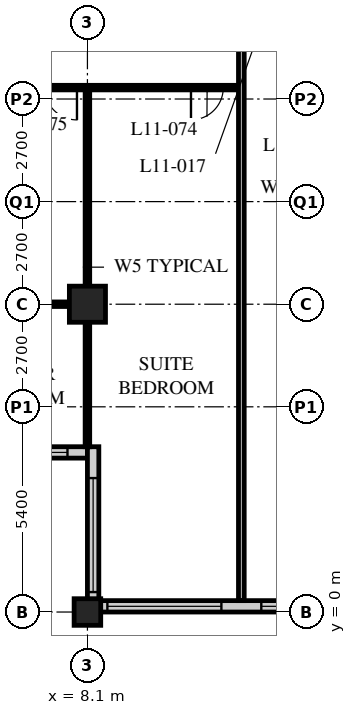
"""IFC4 building model, lengths in metres.
Left out: names, types, materials, properties, quantities, classifications, styles, units other than length and angle.
Written with IfcOpenShell. Run it as: python <this file> out.ifc"""

import sys

from ifc_helpers import new_model, si_unit, direction, frame, frame_2d, origin, origin_2d, place, context, subcontext, project, spatial, rectangle, hollow_rectangle, extrude, element, fill, save


model = new_model("IFC4")
c1 = context("Model", 3, precision=1e-05, world=origin(), true_north=direction((0.0, 1.0)))
c2 = subcontext(c1, "Body", "Model", "MODEL_VIEW")
j1 = project(units=[si_unit("LENGTHUNIT", "METRE"), si_unit("PLANEANGLEUNIT", "RADIAN")], contexts=[c1])
p1 = place(None, origin())
s1 = spatial("IfcSite", under=j1, at=p1, CompositionType="ELEMENT")
p2 = place(p1, origin())
s2 = spatial("IfcBuilding", under=s1, at=p2, CompositionType="ELEMENT")
p3 = place(p2, frame((0.0, 0.0, 50.0)))
s3 = spatial("IfcBuildingStorey", under=s2, at=p3, CompositionType="ELEMENT", Elevation=50.0)
p4 = place(p3, frame((8.1, 0.0, 0.0), z_axis=(0.0, 0.0, 1.0), x_axis=(1.0, 0.0, 0.0)))
e1 = element("IfcColumn", 1, at=p4, inside=s3, PredefinedType="COLUMN", context=c2, shape_type="SweptSolid", body=[
    extrude(hollow_rectangle(XDim=0.7, YDim=0.7, WallThickness=0.06, at=origin_2d()), origin(), (0.0, 0.0, 1.0), 3.4),
])
p5 = place(p3, frame((8.1, 8.1, 0.0), z_axis=(0.0, 0.0, 1.0), x_axis=(1.0, 0.0, 0.0)))
e2 = element("IfcColumn", 2, at=p5, inside=s3, PredefinedType="COLUMN", context=c2, shape_type="SweptSolid", body=[
    extrude(hollow_rectangle(XDim=0.95, YDim=0.95, WallThickness=0.095, at=origin_2d()), origin(), (0.0, 0.0, 1.0), 3.4),
])
p6 = place(p3, frame((8.4, 0.15, 0.0), z_axis=(0.0, 0.0, 1.0), x_axis=(1.0, 0.0, 0.0)))
e3 = element("IfcWall", 3, at=p6, inside=s3, PredefinedType="SOLIDWALL", context=c2, shape_type="SweptSolid", body=[
    extrude(rectangle(XDim=40.2, YDim=0.3, at=frame_2d((20.1, 0.0))), origin(), (0.0, 0.0, 1.0), 3.19),
])
p7 = place(p6, frame((0.225, 0.0, 0.9)))
e4 = element("IfcOpeningElement", 4, at=p7, cuts=e3, PredefinedType="OPENING", context=c2, shape_type="SweptSolid", body=[
    extrude(rectangle(XDim=3.0, YDim=2.0, at=frame_2d((1.5, 1.0))), frame((0.0, 0.16, 0.0), z_axis=(0.0, -1.0, 0.0), x_axis=(1.0, 0.0, 0.0)), (0.0, 0.0, 1.0), 0.32),
])
p8 = place(p6, frame((4.275, 0.0, 0.9)))
e5 = element("IfcOpeningElement", 5, at=p8, cuts=e3, PredefinedType="OPENING", context=c2, shape_type="SweptSolid", body=[
    extrude(rectangle(XDim=3.0, YDim=2.0, at=frame_2d((1.5, 1.0))), frame((0.0, 0.16, 0.0), z_axis=(0.0, -1.0, 0.0), x_axis=(1.0, 0.0, 0.0)), (0.0, 0.0, 1.0), 0.32),
])
p9 = place(p6, frame((8.325, 0.0, 0.9)))
e6 = element("IfcOpeningElement", 6, at=p9, cuts=e3, PredefinedType="OPENING", context=c2, shape_type="SweptSolid", body=[
    extrude(rectangle(XDim=3.0, YDim=2.0, at=frame_2d((1.5, 1.0))), frame((0.0, 0.16, 0.0), z_axis=(0.0, -1.0, 0.0), x_axis=(1.0, 0.0, 0.0)), (0.0, 0.0, 1.0), 0.32),
])
p10 = place(p6, frame((12.375, 0.0, 0.9)))
e7 = element("IfcOpeningElement", 7, at=p10, cuts=e3, PredefinedType="OPENING", context=c2, shape_type="SweptSolid", body=[
    extrude(rectangle(XDim=3.0, YDim=2.0, at=frame_2d((1.5, 1.0))), frame((0.0, 0.16, 0.0), z_axis=(0.0, -1.0, 0.0), x_axis=(1.0, 0.0, 0.0)), (0.0, 0.0, 1.0), 0.32),
])
p11 = place(p6, frame((16.425, 0.0, 0.9)))
e8 = element("IfcOpeningElement", 8, at=p11, cuts=e3, PredefinedType="OPENING", context=c2, shape_type="SweptSolid", body=[
    extrude(rectangle(XDim=3.0, YDim=2.0, at=frame_2d((1.5, 1.0))), frame((0.0, 0.16, 0.0), z_axis=(0.0, -1.0, 0.0), x_axis=(1.0, 0.0, 0.0)), (0.0, 0.0, 1.0), 0.32),
])
p12 = place(p6, frame((20.475, 0.0, 0.9)))
e9 = element("IfcOpeningElement", 9, at=p12, cuts=e3, PredefinedType="OPENING", context=c2, shape_type="SweptSolid", body=[
    extrude(rectangle(XDim=3.0, YDim=2.0, at=frame_2d((1.5, 1.0))), frame((0.0, 0.16, 0.0), z_axis=(0.0, -1.0, 0.0), x_axis=(1.0, 0.0, 0.0)), (0.0, 0.0, 1.0), 0.32),
])
p13 = place(p6, frame((24.525, 0.0, 0.9)))
e10 = element("IfcOpeningElement", 10, at=p13, cuts=e3, PredefinedType="OPENING", context=c2, shape_type="SweptSolid", body=[
    extrude(rectangle(XDim=3.0, YDim=2.0, at=frame_2d((1.5, 1.0))), frame((0.0, 0.16, 0.0), z_axis=(0.0, -1.0, 0.0), x_axis=(1.0, 0.0, 0.0)), (0.0, 0.0, 1.0), 0.32),
])
p14 = place(p6, frame((28.575, 0.0, 0.9)))
e11 = element("IfcOpeningElement", 11, at=p14, cuts=e3, PredefinedType="OPENING", context=c2, shape_type="SweptSolid", body=[
    extrude(rectangle(XDim=3.0, YDim=2.0, at=frame_2d((1.5, 1.0))), frame((0.0, 0.16, 0.0), z_axis=(0.0, -1.0, 0.0), x_axis=(1.0, 0.0, 0.0)), (0.0, 0.0, 1.0), 0.32),
])
p15 = place(p6, frame((32.625, 0.0, 0.9)))
e12 = element("IfcOpeningElement", 12, at=p15, cuts=e3, PredefinedType="OPENING", context=c2, shape_type="SweptSolid", body=[
    extrude(rectangle(XDim=3.0, YDim=2.0, at=frame_2d((1.5, 1.0))), frame((0.0, 0.16, 0.0), z_axis=(0.0, -1.0, 0.0), x_axis=(1.0, 0.0, 0.0)), (0.0, 0.0, 1.0), 0.32),
])
p16 = place(p6, frame((36.675, 0.0, 0.9)))
e13 = element("IfcOpeningElement", 13, at=p16, cuts=e3, PredefinedType="OPENING", context=c2, shape_type="SweptSolid", body=[
    extrude(rectangle(XDim=3.0, YDim=2.0, at=frame_2d((1.5, 1.0))), frame((0.0, 0.16, 0.0), z_axis=(0.0, -1.0, 0.0), x_axis=(1.0, 0.0, 0.0)), (0.0, 0.0, 1.0), 0.32),
])
p17 = place(p3, frame((4.35, 4.2, 0.0), z_axis=(0.0, 0.0, 1.0), x_axis=(1.0, 0.0, 0.0)))
e14 = element("IfcWall", 14, at=p17, inside=s3, PredefinedType="SOLIDWALL", context=c2, shape_type="SweptSolid", body=[
    extrude(rectangle(XDim=3.75, YDim=0.3, at=frame_2d((1.875, 0.0))), origin(), (0.0, 0.0, 1.0), 3.19),
])
p18 = place(p17, frame((0.225, 0.0, 0.9)))
e15 = element("IfcOpeningElement", 15, at=p18, cuts=e14, PredefinedType="OPENING", context=c2, shape_type="SweptSolid", body=[
    extrude(rectangle(XDim=3.0, YDim=1.5, at=frame_2d((1.5, 0.75))), frame((0.0, 0.16, 0.0), z_axis=(0.0, -1.0, 0.0), x_axis=(1.0, 0.0, 0.0)), (0.0, 0.0, 1.0), 0.32),
])
p19 = place(p3, frame((8.25, 4.35, 0.0), z_axis=(0.0, 0.0, 1.0), x_axis=(0.0, -1.0, 0.0)))
e16 = element("IfcWall", 16, at=p19, inside=s3, PredefinedType="SOLIDWALL", context=c2, shape_type="SweptSolid", body=[
    extrude(rectangle(XDim=4.35, YDim=0.3, at=frame_2d((2.175, 0.0))), origin(), (0.0, 0.0, 1.0), 3.19),
])
p20 = place(p19, frame((0.825, 0.0, 0.9)))
e17 = element("IfcOpeningElement", 17, at=p20, cuts=e16, PredefinedType="OPENING", context=c2, shape_type="SweptSolid", body=[
    extrude(rectangle(XDim=3.0, YDim=1.5, at=frame_2d((1.5, 0.75))), frame((0.0, 0.16, 0.0), z_axis=(0.0, -1.0, 0.0), x_axis=(1.0, 0.0, 0.0)), (0.0, 0.0, 1.0), 0.32),
])
p21 = place(p3, frame((4.1, 13.8, 0.0), z_axis=(0.0, 0.0, 1.0), x_axis=(1.0, 0.0, 0.0)))
e18 = element("IfcWall", 18, at=p21, inside=s3, PredefinedType="PARTITIONING", context=c2, shape_type="SweptSolid", body=[
    extrude(rectangle(XDim=8.05, YDim=0.12, at=frame_2d((4.025, 0.0))), origin(), (0.0, 0.0, 1.0), 3.19),
])
p22 = place(p21, frame((6.725, 0.0, 0.0)))
e19 = element("IfcOpeningElement", 19, at=p22, cuts=e18, PredefinedType="OPENING", context=c2, shape_type="SweptSolid", body=[
    extrude(rectangle(XDim=0.85, YDim=2.1, at=frame_2d((0.425, 1.05))), frame((0.0, 0.07, 0.0), z_axis=(0.0, -1.0, 0.0), x_axis=(1.0, 0.0, 0.0)), (0.0, 0.0, 1.0), 0.14),
])
p23 = place(p21, frame((2.875, 0.0, 0.0)))
e20 = element("IfcOpeningElement", 20, at=p23, cuts=e18, PredefinedType="OPENING", context=c2, shape_type="SweptSolid", body=[
    extrude(rectangle(XDim=0.85, YDim=2.1, at=frame_2d((0.425, 1.05))), frame((0.0, 0.07, 0.0), z_axis=(0.0, -1.0, 0.0), x_axis=(1.0, 0.0, 0.0)), (0.0, 0.0, 1.0), 0.14),
])
p24 = place(p3, frame((8.1, 13.8, 0.0), z_axis=(0.0, 0.0, 1.0), x_axis=(0.0, -1.0, 0.0)))
e21 = element("IfcWall", 21, at=p24, inside=s3, PredefinedType="PARTITIONING", context=c2, shape_type="SweptSolid", body=[
    extrude(rectangle(XDim=9.45, YDim=0.12, at=frame_2d((4.725, 0.0))), origin(), (0.0, 0.0, 1.0), 2.578),
])
p25 = place(p3, frame((8.1, 8.1, 0.0), z_axis=(0.0, 0.0, 1.0), x_axis=(-1.0, 0.0, 0.0)))
e22 = element("IfcWall", 22, at=p25, inside=s3, PredefinedType="PARTITIONING", context=c2, shape_type="SweptSolid", body=[
    extrude(rectangle(XDim=3.75, YDim=0.12, at=frame_2d((1.875, 0.0))), origin(), (0.0, 0.0, 1.0), 2.578),
])
p26 = place(p25, frame((1.875, 0.0, 0.0)))
e23 = element("IfcOpeningElement", 23, at=p26, cuts=e22, PredefinedType="OPENING", context=c2, shape_type="SweptSolid", body=[
    extrude(rectangle(XDim=0.85, YDim=2.1, at=frame_2d((0.425, 1.05))), frame((0.0, 0.07, 0.0), z_axis=(0.0, -1.0, 0.0), x_axis=(1.0, 0.0, 0.0)), (0.0, 0.0, 1.0), 0.14),
])
p27 = place(p3, frame((12.15, 16.2, 0.0), z_axis=(0.0, 0.0, 1.0), x_axis=(0.0, -1.0, 0.0)))
e24 = element("IfcWall", 24, at=p27, inside=s3, PredefinedType="PARTITIONING", context=c2, shape_type="SweptSolid", body=[
    extrude(rectangle(XDim=15.9, YDim=0.15, at=frame_2d((7.95, 0.0))), origin(), (0.0, 0.0, 1.0), 3.19),
])
p28 = place(p7, origin())
e25 = element("IfcWindow", 25, at=p28, inside=s3, PartitioningType="SINGLE_PANEL", PredefinedType="WINDOW", context=c2, shape_type="SweptSolid", body=[
    extrude(rectangle(XDim=3.0, YDim=2.0, at=frame_2d((1.5, 1.0))), frame((0.0, 0.03, 0.0), z_axis=(0.0, -1.0, 0.0), x_axis=(1.0, 0.0, 0.0)), (0.0, 0.0, 1.0), 0.06),
])
fill(e4, e25)
p29 = place(p8, origin())
e26 = element("IfcWindow", 26, at=p29, inside=s3, PartitioningType="SINGLE_PANEL", PredefinedType="WINDOW", context=c2, shape_type="SweptSolid", body=[
    extrude(rectangle(XDim=3.0, YDim=2.0, at=frame_2d((1.5, 1.0))), frame((0.0, 0.03, 0.0), z_axis=(0.0, -1.0, 0.0), x_axis=(1.0, 0.0, 0.0)), (0.0, 0.0, 1.0), 0.06),
])
fill(e5, e26)
p30 = place(p18, origin())
e27 = element("IfcWindow", 27, at=p30, inside=s3, PartitioningType="SINGLE_PANEL", PredefinedType="WINDOW", context=c2, shape_type="SweptSolid", body=[
    extrude(rectangle(XDim=3.0, YDim=1.5, at=frame_2d((1.5, 0.75))), frame((0.0, 0.03, 0.0), z_axis=(0.0, -1.0, 0.0), x_axis=(1.0, 0.0, 0.0)), (0.0, 0.0, 1.0), 0.06),
])
fill(e15, e27)
p31 = place(p20, origin())
e28 = element("IfcWindow", 28, at=p31, inside=s3, PartitioningType="SINGLE_PANEL", PredefinedType="WINDOW", context=c2, shape_type="SweptSolid", body=[
    extrude(rectangle(XDim=3.0, YDim=1.5, at=frame_2d((1.5, 0.75))), frame((0.0, 0.03, 0.0), z_axis=(0.0, -1.0, 0.0), x_axis=(1.0, 0.0, 0.0)), (0.0, 0.0, 1.0), 0.06),
])
fill(e17, e28)
p32 = place(p22, origin())
e29 = element("IfcDoor", 29, at=p32, inside=s3, OperationType="SINGLE_SWING_RIGHT", PredefinedType="DOOR", context=c2, shape_type="SweptSolid", body=[
    extrude(rectangle(XDim=0.85, YDim=2.1, at=frame_2d((0.425, 1.05))), frame((0.0, 0.025, 0.0), z_axis=(0.0, -1.0, 0.0), x_axis=(1.0, 0.0, 0.0)), (0.0, 0.0, 1.0), 0.05),
])
fill(e19, e29)
p33 = place(p23, origin())
e30 = element("IfcDoor", 30, at=p33, inside=s3, OperationType="SINGLE_SWING_LEFT", PredefinedType="DOOR", context=c2, shape_type="SweptSolid", body=[
    extrude(rectangle(XDim=0.85, YDim=2.1, at=frame_2d((0.425, 1.05))), frame((0.0, 0.025, 0.0), z_axis=(0.0, -1.0, 0.0), x_axis=(1.0, 0.0, 0.0)), (0.0, 0.0, 1.0), 0.05),
])
fill(e20, e30)
save(model, sys.argv[1])
